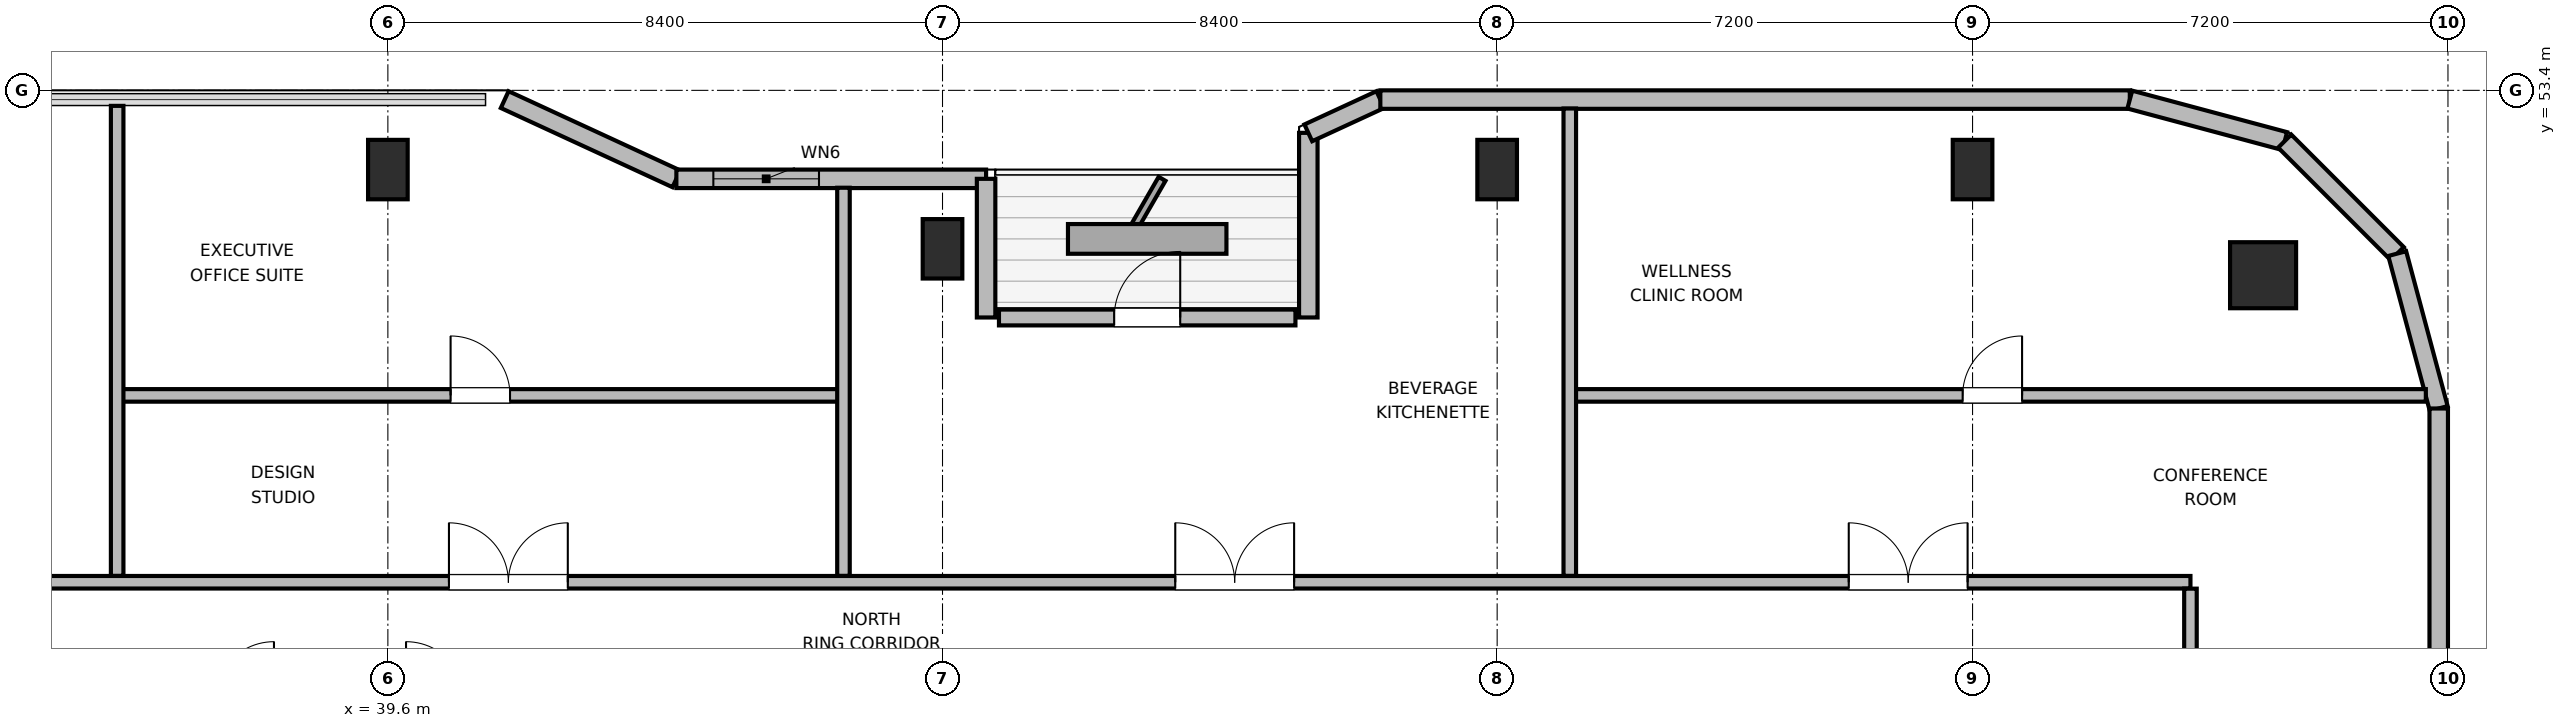
"""IFC4 building model, lengths in metres.
Left out: names, types, materials, properties, quantities, classifications, styles, units other than length and angle.
Written with IfcOpenShell. Run it as: python <this file> out.ifc"""

import sys

from ifc_helpers import new_model, si_unit, direction, frame, frame_2d, origin, origin_2d, place, context, subcontext, project, spatial, rectangle, circle, extrude, element, fill, save


model = new_model("IFC4")
c1 = context("Model", 3, precision=1e-05, world=origin(), true_north=direction((0.0, 1.0)))
c2 = subcontext(c1, "Body", "Model", "MODEL_VIEW")
j1 = project(units=[si_unit("LENGTHUNIT", "METRE"), si_unit("PLANEANGLEUNIT", "RADIAN")], contexts=[c1])
p1 = place(None, origin())
s1 = spatial("IfcSite", under=j1, at=p1, CompositionType="ELEMENT")
p2 = place(p1, origin())
s2 = spatial("IfcBuilding", under=s1, at=p2, CompositionType="ELEMENT")
p3 = place(p2, frame((0.0, 0.0, 325.8)))
s3 = spatial("IfcBuildingStorey", under=s2, at=p3, CompositionType="ELEMENT", Elevation=325.8)
p4 = place(p3, frame((68.0, 50.6, 0.0), z_axis=(0.0, 0.0, 1.0), x_axis=(1.0, 0.0, 0.0)))
e1 = element("IfcColumn", 1, at=p4, inside=s3, PredefinedType="COLUMN", context=c2, shape_type="SweptSolid", body=[
    extrude(circle(Radius=0.5, at=origin_2d()), origin(), (0.0, 0.0, 1.0), 3.9),
])
for number, where, z_axis, x_axis in (
    (2, (39.6, 52.2, 0.0), (0.0, 0.0, 1.0), (1.0, 0.0, 0.0)),
    (3, (48.0, 51.0, 0.0), (0.0, 0.0, 1.0), (1.0, 0.0, 0.0)),
    (4, (56.4, 52.2, 0.0), (0.0, 0.0, 1.0), (1.0, 0.0, 0.0)),
    (5, (63.6, 52.2, 0.0), (0.0, 0.0, 1.0), (1.0, 0.0, 0.0)),
):
    element("IfcColumn", number, at=place(p3, frame(where, z_axis=z_axis, x_axis=x_axis)), inside=s3, PredefinedType="COLUMN", context=c2, shape_type="SweptSolid", body=[
        extrude(rectangle(XDim=0.6, YDim=0.9, at=origin_2d()), origin(), (0.0, 0.0, 1.0), 3.9),
    ])
p5 = place(p3, frame((41.369, 53.26, 0.0), z_axis=(0.0, 0.0, 1.0), x_axis=(0.907956889006, -0.419063584324, 0.0)))
e6 = element("IfcWall", 6, at=p5, inside=s3, PredefinedType="SOLIDWALL", context=c2, shape_type="SweptSolid", body=[
    extrude(rectangle(XDim=2.864, YDim=0.28, at=frame_2d((1.432, 0.0))), origin(), (0.0, 0.0, 1.0), 2.265),
])
p6 = place(p3, frame((43.969, 52.06, 0.0), z_axis=(0.0, 0.0, 1.0), x_axis=(1.0, 0.0, 0.0)))
e7 = element("IfcWall", 7, at=p6, inside=s3, PredefinedType="SOLIDWALL", context=c2, shape_type="SweptSolid", body=[
    extrude(rectangle(XDim=4.691, YDim=0.28, at=frame_2d((2.345, 0.0))), origin(), (0.0, 0.0, 1.0), 2.265),
])
p7 = place(p6, frame((0.56, 0.0, 0.85)))
e8 = element("IfcOpeningElement", 8, at=p7, cuts=e7, PredefinedType="OPENING", context=c2, shape_type="SweptSolid", body=[
    extrude(rectangle(XDim=1.6, YDim=1.0, at=frame_2d((0.8, 0.5))), frame((0.0, 0.15, 0.0), z_axis=(0.0, -1.0, 0.0), x_axis=(1.0, 0.0, 0.0)), (0.0, 0.0, 1.0), 0.3),
])
p8 = place(p3, frame((48.66, 52.06, 0.0), z_axis=(0.0, 0.0, 1.0), x_axis=(0.0, -1.0, 0.0)))
e9 = element("IfcWall", 9, at=p8, inside=s3, PredefinedType="SOLIDWALL", context=c2, shape_type="SweptSolid", body=[
    extrude(rectangle(XDim=2.1, YDim=0.28, at=frame_2d((1.05, 0.0))), origin(), (0.0, 0.0, 1.0), 2.265),
])
p9 = place(p3, frame((48.855, 49.96, 0.0), z_axis=(0.0, 0.0, 1.0), x_axis=(1.0, 0.0, 0.0)))
e10 = element("IfcWall", 10, at=p9, inside=s3, PredefinedType="SOLIDWALL", context=c2, shape_type="SweptSolid", body=[
    extrude(rectangle(XDim=4.49, YDim=0.24, at=frame_2d((2.245, 0.0))), origin(), (0.0, 0.0, 1.0), 3.68),
])
p10 = place(p9, frame((1.745, 0.0, 0.0)))
e11 = element("IfcOpeningElement", 11, at=p10, cuts=e10, PredefinedType="OPENING", context=c2, shape_type="SweptSolid", body=[
    extrude(rectangle(XDim=1.0, YDim=2.02, at=frame_2d((0.5, 1.01))), frame((0.0, 0.13, 0.0), z_axis=(0.0, -1.0, 0.0), x_axis=(1.0, 0.0, 0.0)), (0.0, 0.0, 1.0), 0.26),
])
p11 = place(p3, frame((53.54, 49.96, 0.0), z_axis=(0.0, 0.0, 1.0), x_axis=(0.0, 1.0, 0.0)))
e12 = element("IfcWall", 12, at=p11, inside=s3, PredefinedType="SOLIDWALL", context=c2, shape_type="SweptSolid", body=[
    extrude(rectangle(XDim=2.796, YDim=0.28, at=frame_2d((1.398, 0.0))), origin(), (0.0, 0.0, 1.0), 2.265),
])
p12 = place(p3, frame((53.54, 52.756, 0.0), z_axis=(0.0, 0.0, 1.0), x_axis=(0.907893953211, 0.419199916176, 0.0)))
e13 = element("IfcWall", 13, at=p12, inside=s3, PredefinedType="SOLIDWALL", context=c2, shape_type="SweptSolid", body=[
    extrude(rectangle(XDim=1.201, YDim=0.28, at=frame_2d((0.601, 0.0))), origin(), (0.0, 0.0, 1.0), 3.68),
])
p13 = place(p3, frame((54.631, 53.26, 0.0), z_axis=(0.0, 0.0, 1.0), x_axis=(1.0, 0.0, 0.0)))
e14 = element("IfcWall", 14, at=p13, inside=s3, PredefinedType="SOLIDWALL", context=c2, shape_type="SweptSolid", body=[
    extrude(rectangle(XDim=11.351, YDim=0.28, at=frame_2d((5.675, 0.0))), origin(), (0.0, 0.0, 1.0), 3.68),
])
p14 = place(p3, frame((65.982, 53.26, 0.0), z_axis=(0.0, 0.0, 1.0), x_axis=(0.965937282298, -0.25877628691, 0.0)))
e15 = element("IfcWall", 15, at=p14, inside=s3, PredefinedType="SOLIDWALL", context=c2, shape_type="SweptSolid", body=[
    extrude(rectangle(XDim=2.428, YDim=0.28, at=frame_2d((1.214, 0.0))), origin(), (0.0, 0.0, 1.0), 3.68),
])
p15 = place(p3, frame((68.327, 52.632, 0.0), z_axis=(0.0, 0.0, 1.0), x_axis=(0.707106781187, -0.707106781187, 0.0)))
e16 = element("IfcWall", 16, at=p15, inside=s3, PredefinedType="SOLIDWALL", context=c2, shape_type="SweptSolid", body=[
    extrude(rectangle(XDim=2.41, YDim=0.28, at=frame_2d((1.205, 0.0))), origin(), (0.0, 0.0, 1.0), 3.68),
])
p16 = place(p3, frame((70.031, 50.927, 0.0), z_axis=(0.0, 0.0, 1.0), x_axis=(0.258751159445, -0.965944013639, 0.0)))
e17 = element("IfcWall", 17, at=p16, inside=s3, PredefinedType="SOLIDWALL", context=c2, shape_type="SweptSolid", body=[
    extrude(rectangle(XDim=2.429, YDim=0.28, at=frame_2d((1.214, 0.0))), origin(), (0.0, 0.0, 1.0), 3.68),
])
p17 = place(p3, frame((70.66, 48.582, 0.0), z_axis=(0.0, 0.0, 1.0), x_axis=(0.0, -1.0, 0.0)))
e18 = element("IfcWall", 18, at=p17, inside=s3, PredefinedType="SOLIDWALL", context=c2, shape_type="SweptSolid", body=[
    extrude(rectangle(XDim=5.842, YDim=0.28, at=frame_2d((2.921, 0.0))), origin(), (0.0, 0.0, 1.0), 3.68),
])
p18 = place(p3, frame((30.6, 45.95, 0.0), z_axis=(0.0, 0.0, 1.0), x_axis=(1.0, 0.0, 0.0)))
e19 = element("IfcWall", 19, at=p18, inside=s3, PredefinedType="PLUMBINGWALL", context=c2, shape_type="SweptSolid", body=[
    extrude(rectangle(XDim=36.3, YDim=0.19, at=frame_2d((18.15, 0.0))), origin(), (0.0, 0.0, 1.0), 3.68),
])
p19 = place(p18, frame((1.975, 0.0, 0.0)))
e20 = element("IfcOpeningElement", 20, at=p19, cuts=e19, PredefinedType="OPENING", context=c2, shape_type="SweptSolid", body=[
    extrude(rectangle(XDim=1.8, YDim=2.06, at=frame_2d((0.9, 1.03))), frame((0.0, 0.105, 0.0), z_axis=(0.0, -1.0, 0.0), x_axis=(1.0, 0.0, 0.0)), (0.0, 0.0, 1.0), 0.21),
])
p20 = place(p18, frame((9.925, 0.0, 0.0)))
e21 = element("IfcOpeningElement", 21, at=p20, cuts=e19, PredefinedType="OPENING", context=c2, shape_type="SweptSolid", body=[
    extrude(rectangle(XDim=1.8, YDim=2.06, at=frame_2d((0.9, 1.03))), frame((0.0, 0.105, 0.0), z_axis=(0.0, -1.0, 0.0), x_axis=(1.0, 0.0, 0.0)), (0.0, 0.0, 1.0), 0.21),
])
p21 = place(p18, frame((20.925, 0.0, 0.0)))
e22 = element("IfcOpeningElement", 22, at=p21, cuts=e19, PredefinedType="OPENING", context=c2, shape_type="SweptSolid", body=[
    extrude(rectangle(XDim=1.8, YDim=2.06, at=frame_2d((0.9, 1.03))), frame((0.0, 0.105, 0.0), z_axis=(0.0, -1.0, 0.0), x_axis=(1.0, 0.0, 0.0)), (0.0, 0.0, 1.0), 0.21),
])
p22 = place(p18, frame((31.125, 0.0, 0.0)))
e23 = element("IfcOpeningElement", 23, at=p22, cuts=e19, PredefinedType="OPENING", context=c2, shape_type="SweptSolid", body=[
    extrude(rectangle(XDim=1.8, YDim=2.06, at=frame_2d((0.9, 1.03))), frame((0.0, 0.105, 0.0), z_axis=(0.0, -1.0, 0.0), x_axis=(1.0, 0.0, 0.0)), (0.0, 0.0, 1.0), 0.21),
])
p23 = place(p3, frame((66.9, 26.147, 0.0), z_axis=(0.0, 0.0, 1.0), x_axis=(0.0, 1.0, 0.0)))
e24 = element("IfcWall", 24, at=p23, inside=s3, PredefinedType="PLUMBINGWALL", context=c2, shape_type="SweptSolid", body=[
    extrude(rectangle(XDim=19.706, YDim=0.19, at=frame_2d((9.853, 0.0))), origin(), (0.0, 0.0, 1.0), 3.68),
])
p24 = place(p23, frame((5.003, 0.0, 0.0)))
e25 = element("IfcOpeningElement", 25, at=p24, cuts=e24, PredefinedType="OPENING", context=c2, shape_type="SweptSolid", body=[
    extrude(rectangle(XDim=0.95, YDim=2.04, at=frame_2d((0.475, 1.02))), frame((0.0, 0.105, 0.0), z_axis=(0.0, -1.0, 0.0), x_axis=(1.0, 0.0, 0.0)), (0.0, 0.0, 1.0), 0.21),
])
p25 = place(p23, frame((14.953, 0.0, 0.0)))
e26 = element("IfcOpeningElement", 26, at=p25, cuts=e24, PredefinedType="OPENING", context=c2, shape_type="SweptSolid", body=[
    extrude(rectangle(XDim=0.95, YDim=2.04, at=frame_2d((0.475, 1.02))), frame((0.0, 0.105, 0.0), z_axis=(0.0, -1.0, 0.0), x_axis=(1.0, 0.0, 0.0)), (0.0, 0.0, 1.0), 0.21),
])
p26 = place(p3, frame((35.5, 48.78, 0.0), z_axis=(0.0, 0.0, 1.0), x_axis=(1.0, 0.0, 0.0)))
e27 = element("IfcWall", 27, at=p26, inside=s3, PredefinedType="PLUMBINGWALL", context=c2, shape_type="SweptSolid", body=[
    extrude(rectangle(XDim=11.0, YDim=0.19, at=frame_2d((5.5, 0.0))), origin(), (0.0, 0.0, 1.0), 3.311),
])
p27 = place(p26, frame((5.05, 0.0, 0.0)))
e28 = element("IfcOpeningElement", 28, at=p27, cuts=e27, PredefinedType="OPENING", context=c2, shape_type="SweptSolid", body=[
    extrude(rectangle(XDim=0.9, YDim=2.02, at=frame_2d((0.45, 1.01))), frame((0.0, 0.105, 0.0), z_axis=(0.0, -1.0, 0.0), x_axis=(1.0, 0.0, 0.0)), (0.0, 0.0, 1.0), 0.21),
])
p28 = place(p3, frame((35.5, 46.047, 0.0), z_axis=(0.0, 0.0, 1.0), x_axis=(0.0, 1.0, 0.0)))
e29 = element("IfcWall", 29, at=p28, inside=s3, PredefinedType="PLUMBINGWALL", context=c2, shape_type="SweptSolid", body=[
    extrude(rectangle(XDim=7.118, YDim=0.19, at=frame_2d((3.559, 0.0))), origin(), (0.0, 0.0, 1.0), 3.68),
])
p29 = place(p3, frame((46.5, 46.047, 0.0), z_axis=(0.0, 0.0, 1.0), x_axis=(0.0, 1.0, 0.0)))
e30 = element("IfcWall", 30, at=p29, inside=s3, PredefinedType="PLUMBINGWALL", context=c2, shape_type="SweptSolid", body=[
    extrude(rectangle(XDim=5.878, YDim=0.19, at=frame_2d((2.939, 0.0))), origin(), (0.0, 0.0, 1.0), 3.68),
])
p30 = place(p3, frame((57.5, 48.78, 0.0), z_axis=(0.0, 0.0, 1.0), x_axis=(1.0, 0.0, 0.0)))
e31 = element("IfcWall", 31, at=p30, inside=s3, PredefinedType="PLUMBINGWALL", context=c2, shape_type="SweptSolid", body=[
    extrude(rectangle(XDim=12.965, YDim=0.19, at=frame_2d((6.482, 0.0))), origin(), (0.0, 0.0, 1.0), 3.311),
])
p31 = place(p30, frame((5.95, 0.0, 0.0)))
e32 = element("IfcOpeningElement", 32, at=p31, cuts=e31, PredefinedType="OPENING", context=c2, shape_type="SweptSolid", body=[
    extrude(rectangle(XDim=0.9, YDim=2.02, at=frame_2d((0.45, 1.01))), frame((0.0, 0.105, 0.0), z_axis=(0.0, -1.0, 0.0), x_axis=(1.0, 0.0, 0.0)), (0.0, 0.0, 1.0), 0.21),
])
p32 = place(p3, frame((57.5, 46.047, 0.0), z_axis=(0.0, 0.0, 1.0), x_axis=(0.0, 1.0, 0.0)))
e33 = element("IfcWall", 33, at=p32, inside=s3, PredefinedType="PLUMBINGWALL", context=c2, shape_type="SweptSolid", body=[
    extrude(rectangle(XDim=7.078, YDim=0.19, at=frame_2d((3.539, 0.0))), origin(), (0.0, 0.0, 1.0), 3.68),
])
p33 = place(p7, origin())
e34 = element("IfcWindow", 34, at=p33, inside=s3, PartitioningType="SINGLE_PANEL", PredefinedType="WINDOW", context=c2, shape_type="SweptSolid", body=[
    extrude(rectangle(XDim=1.6, YDim=1.0, at=frame_2d((0.8, 0.5))), frame((0.0, 0.03, 0.0), z_axis=(0.0, -1.0, 0.0), x_axis=(1.0, 0.0, 0.0)), (0.0, 0.0, 1.0), 0.06),
])
fill(e8, e34)
p34 = place(p10, origin())
e35 = element("IfcDoor", 35, at=p34, inside=s3, OperationType="SINGLE_SWING_RIGHT", PredefinedType="DOOR", context=c2, shape_type="SweptSolid", body=[
    extrude(rectangle(XDim=1.0, YDim=2.02, at=frame_2d((0.5, 1.01))), frame((0.0, 0.025, 0.0), z_axis=(0.0, -1.0, 0.0), x_axis=(1.0, 0.0, 0.0)), (0.0, 0.0, 1.0), 0.05),
])
fill(e11, e35)
p35 = place(p27, origin())
e36 = element("IfcDoor", 36, at=p35, inside=s3, OperationType="SINGLE_SWING_LEFT", PredefinedType="DOOR", context=c2, shape_type="SweptSolid", body=[
    extrude(rectangle(XDim=0.9, YDim=2.02, at=frame_2d((0.45, 1.01))), frame((0.0, 0.025, 0.0), z_axis=(0.0, -1.0, 0.0), x_axis=(1.0, 0.0, 0.0)), (0.0, 0.0, 1.0), 0.05),
])
fill(e28, e36)
p36 = place(p20, origin())
e37 = element("IfcDoor", 37, at=p36, inside=s3, OperationType="DOUBLE_DOOR_SINGLE_SWING", PredefinedType="DOOR", context=c2, shape_type="SweptSolid", body=[
    extrude(rectangle(XDim=1.8, YDim=2.06, at=frame_2d((0.9, 1.03))), frame((0.0, 0.025, 0.0), z_axis=(0.0, -1.0, 0.0), x_axis=(1.0, 0.0, 0.0)), (0.0, 0.0, 1.0), 0.05),
])
fill(e21, e37)
p37 = place(p21, origin())
e38 = element("IfcDoor", 38, at=p37, inside=s3, OperationType="DOUBLE_DOOR_SINGLE_SWING", PredefinedType="DOOR", context=c2, shape_type="SweptSolid", body=[
    extrude(rectangle(XDim=1.8, YDim=2.06, at=frame_2d((0.9, 1.03))), frame((0.0, 0.025, 0.0), z_axis=(0.0, -1.0, 0.0), x_axis=(1.0, 0.0, 0.0)), (0.0, 0.0, 1.0), 0.05),
])
fill(e22, e38)
p38 = place(p31, origin())
e39 = element("IfcDoor", 39, at=p38, inside=s3, OperationType="SINGLE_SWING_RIGHT", PredefinedType="DOOR", context=c2, shape_type="SweptSolid", body=[
    extrude(rectangle(XDim=0.9, YDim=2.02, at=frame_2d((0.45, 1.01))), frame((0.0, 0.025, 0.0), z_axis=(0.0, -1.0, 0.0), x_axis=(1.0, 0.0, 0.0)), (0.0, 0.0, 1.0), 0.05),
])
fill(e32, e39)
p39 = place(p22, origin())
e40 = element("IfcDoor", 40, at=p39, inside=s3, OperationType="DOUBLE_DOOR_SINGLE_SWING", PredefinedType="DOOR", context=c2, shape_type="SweptSolid", body=[
    extrude(rectangle(XDim=1.8, YDim=2.06, at=frame_2d((0.9, 1.03))), frame((0.0, 0.025, 0.0), z_axis=(0.0, -1.0, 0.0), x_axis=(1.0, 0.0, 0.0)), (0.0, 0.0, 1.0), 0.05),
])
fill(e23, e40)
save(model, sys.argv[1])
